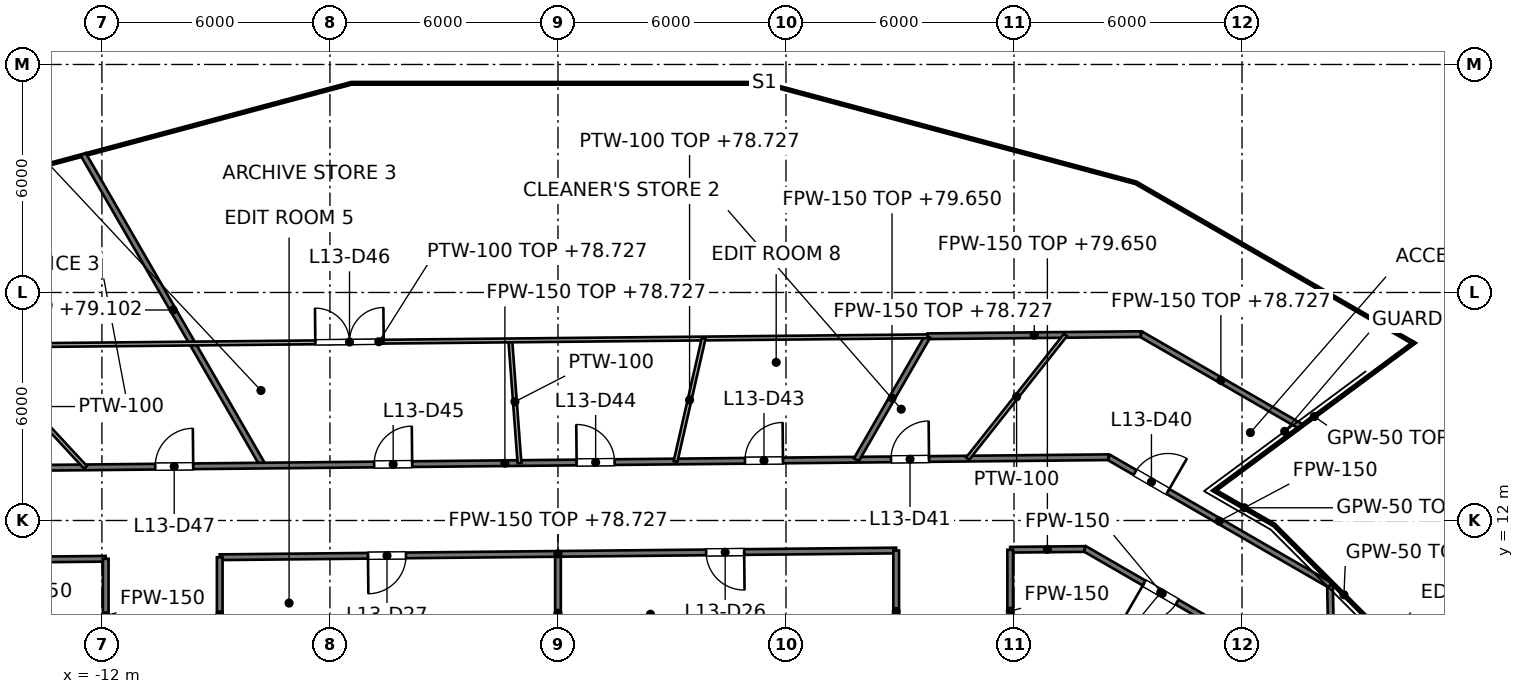
"""IFC4 building model, lengths in metres.
Left out: names, types, materials, properties, quantities, classifications, styles, units other than length and angle.
Written with IfcOpenShell. Run it as: python <this file> out.ifc"""

import sys

from ifc_helpers import new_model, si_unit, direction, frame, frame_2d, origin, place, context, subcontext, project, spatial, rectangle, extrude, element, fill, save


model = new_model("IFC4")
c1 = context("Model", 3, precision=1e-05, world=origin(), true_north=direction((0.0, 1.0)))
c2 = subcontext(c1, "Body", "Model", "MODEL_VIEW")
j1 = project(units=[si_unit("LENGTHUNIT", "METRE"), si_unit("PLANEANGLEUNIT", "RADIAN")], contexts=[c1])
p1 = place(None, origin())
s1 = spatial("IfcSite", under=j1, at=p1, CompositionType="ELEMENT")
p2 = place(p1, origin())
s2 = spatial("IfcBuilding", under=s1, at=p2, CompositionType="ELEMENT")
p3 = place(p2, frame((0.0, 0.0, 75.6)))
s3 = spatial("IfcBuildingStorey", under=s2, at=p3, CompositionType="ELEMENT", Elevation=75.6)
p4 = place(p3, frame((20.314, 10.301, 0.0), z_axis=(0.0, 0.0, 1.0), x_axis=(0.020779303351, -0.999784086967, 0.0)))
e1 = element("IfcWall", 1, at=p4, inside=s3, PredefinedType="PARTITIONING", context=c2, shape_type="SweptSolid", body=[
    extrude(rectangle(XDim=17.765, YDim=0.15, at=frame_2d((8.882, 0.0))), origin(), (0.0, 0.0, 1.0), 3.118),
])
p5 = place(p4, frame((13.714, 0.0, 0.0)))
e2 = element("IfcOpeningElement", 2, at=p5, cuts=e1, PredefinedType="OPENING", context=c2, shape_type="SweptSolid", body=[
    extrude(rectangle(XDim=1.0, YDim=2.1, at=frame_2d((0.5, 1.05))), frame((0.0, 0.075, 0.0), z_axis=(0.0, -1.0, 0.0), x_axis=(1.0, 0.0, 0.0)), (0.0, 0.0, 1.0), 0.15),
])
p6 = place(p4, frame((5.797, 0.0, 0.0)))
e3 = element("IfcOpeningElement", 3, at=p6, cuts=e1, PredefinedType="OPENING", context=c2, shape_type="SweptSolid", body=[
    extrude(rectangle(XDim=1.0, YDim=2.1, at=frame_2d((0.5, 1.05))), frame((0.0, 0.075, 0.0), z_axis=(0.0, -1.0, 0.0), x_axis=(1.0, 0.0, 0.0)), (0.0, 0.0, 1.0), 0.15),
])
p7 = place(p3, frame((-12.491, 21.634, 0.0), z_axis=(0.0, 0.0, 1.0), x_axis=(0.500023386278, -0.86601190129, 0.0)))
e4 = element("IfcWall", 4, at=p7, inside=s3, PredefinedType="PARTITIONING", context=c2, shape_type="SweptSolid", body=[
    extrude(rectangle(XDim=9.457, YDim=0.15, at=frame_2d((4.729, 0.0))), origin(), (0.0, 0.0, 1.0), 3.502),
])
p8 = place(p3, frame((13.856, 11.259, 0.0), z_axis=(0.0, 0.0, 1.0), x_axis=(0.865971100816, -0.500094043707, 0.0)))
e5 = element("IfcWall", 5, at=p8, inside=s3, PredefinedType="PARTITIONING", context=c2, shape_type="SweptSolid", body=[
    extrude(rectangle(XDim=4.72, YDim=0.15, at=frame_2d((2.36, 0.0))), origin(), (0.0, 0.0, 1.0), 3.195),
])
p9 = place(p8, frame((1.812, 0.0, 0.0)))
e6 = element("IfcOpeningElement", 6, at=p9, cuts=e5, PredefinedType="OPENING", context=c2, shape_type="SweptSolid", body=[
    extrude(rectangle(XDim=1.0, YDim=2.1, at=frame_2d((0.5, 1.05))), frame((0.0, 0.075, 0.0), z_axis=(0.0, -1.0, 0.0), x_axis=(1.0, 0.0, 0.0)), (0.0, 0.0, 1.0), 0.15),
])
p10 = place(p3, frame((14.488, 13.665, 0.0), z_axis=(0.0, 0.0, 1.0), x_axis=(0.865978916812, -0.500080509155, 0.0)))
e7 = element("IfcWall", 7, at=p10, inside=s3, PredefinedType="PARTITIONING", context=c2, shape_type="SweptSolid", body=[
    extrude(rectangle(XDim=6.729, YDim=0.15, at=frame_2d((3.364, 0.0))), origin(), (0.0, 0.0, 1.0), 3.195),
])
p11 = place(p10, frame((0.803, 0.0, 0.0)))
e8 = element("IfcOpeningElement", 8, at=p11, cuts=e7, PredefinedType="OPENING", context=c2, shape_type="SweptSolid", body=[
    extrude(rectangle(XDim=1.0, YDim=2.1, at=frame_2d((0.5, 1.05))), frame((0.0, 0.075, 0.0), z_axis=(0.0, -1.0, 0.0), x_axis=(1.0, 0.0, 0.0)), (0.0, 0.0, 1.0), 0.15),
])
p12 = place(p3, frame((15.339, 16.904, 0.0), z_axis=(0.0, 0.0, 1.0), x_axis=(0.865946300372, -0.500136986107, 0.0)))
e9 = element("IfcWall", 9, at=p12, inside=s3, PredefinedType="PARTITIONING", context=c2, shape_type="SweptSolid", body=[
    extrude(rectangle(XDim=4.86, YDim=0.15, at=frame_2d((2.43, 0.0))), origin(), (0.0, 0.0, 1.0), 3.127),
])
p13 = place(p3, frame((-15.887, 10.953, 0.0), z_axis=(0.0, 0.0, 1.0), x_axis=(0.999950802569, 0.009919296431, 0.0)))
e10 = element("IfcWall", 10, at=p13, inside=s3, PredefinedType="PARTITIONING", context=c2, shape_type="SweptSolid", body=[
    extrude(rectangle(XDim=3.987, YDim=0.15, at=frame_2d((1.994, 0.0))), origin(), (0.0, 0.0, 1.0), 3.195),
])
p14 = place(p3, frame((-8.9, 11.033, 0.0), z_axis=(0.0, 0.0, 1.0), x_axis=(0.999950834077, 0.009916119672, 0.0)))
e11 = element("IfcWall", 11, at=p14, inside=s3, PredefinedType="PARTITIONING", context=c2, shape_type="SweptSolid", body=[
    extrude(rectangle(XDim=17.801, YDim=0.15, at=frame_2d((8.9, 0.0))), origin(), (0.0, 0.0, 1.0), 3.127),
])
p15 = place(p14, frame((12.8, 0.0, 0.0)))
e12 = element("IfcOpeningElement", 12, at=p15, cuts=e11, PredefinedType="OPENING", context=c2, shape_type="SweptSolid", body=[
    extrude(rectangle(XDim=1.0, YDim=2.1, at=frame_2d((0.5, 1.05))), frame((0.0, 0.075, 0.0), z_axis=(0.0, -1.0, 0.0), x_axis=(1.0, 0.0, 0.0)), (0.0, 0.0, 1.0), 0.15),
])
p16 = place(p14, frame((3.901, 0.0, 0.0)))
e13 = element("IfcOpeningElement", 13, at=p16, cuts=e11, PredefinedType="OPENING", context=c2, shape_type="SweptSolid", body=[
    extrude(rectangle(XDim=1.0, YDim=2.1, at=frame_2d((0.5, 1.05))), frame((0.0, 0.075, 0.0), z_axis=(0.0, -1.0, 0.0), x_axis=(1.0, 0.0, 0.0)), (0.0, 0.0, 1.0), 0.15),
])
p17 = place(p3, frame((11.9, 11.23, 0.0), z_axis=(0.0, 0.0, 1.0), x_axis=(0.99995016583, 0.00998327883, 0.0)))
e14 = element("IfcWall", 14, at=p17, inside=s3, PredefinedType="PARTITIONING", context=c2, shape_type="SweptSolid", body=[
    extrude(rectangle(XDim=1.956, YDim=0.15, at=frame_2d((0.978, 0.0))), origin(), (0.0, 0.0, 1.0), 4.05),
])
p18 = place(p3, frame((-17.281, 13.35, 0.0), z_axis=(0.0, 0.0, 1.0), x_axis=(0.999950941336, 0.009905297661, 0.0)))
e15 = element("IfcWall", 15, at=p18, inside=s3, PredefinedType="PARTITIONING", context=c2, shape_type="SweptSolid", body=[
    extrude(rectangle(XDim=31.771, YDim=0.15, at=frame_2d((15.885, 0.0))), origin(), (0.0, 0.0, 1.0), 3.127),
])
p19 = place(p18, frame((26.046, 0.0, 0.0)))
e16 = element("IfcOpeningElement", 16, at=p19, cuts=e15, PredefinedType="OPENING", context=c2, shape_type="SweptSolid", body=[
    extrude(rectangle(XDim=1.0, YDim=2.1, at=frame_2d((0.5, 1.05))), frame((0.0, 0.075, 0.0), z_axis=(0.0, -1.0, 0.0), x_axis=(1.0, 0.0, 0.0)), (0.0, 0.0, 1.0), 0.15),
])
p20 = place(p18, frame((22.203, 0.0, 0.0)))
e17 = element("IfcOpeningElement", 17, at=p20, cuts=e15, PredefinedType="OPENING", context=c2, shape_type="SweptSolid", body=[
    extrude(rectangle(XDim=1.0, YDim=2.1, at=frame_2d((0.5, 1.05))), frame((0.0, 0.075, 0.0), z_axis=(0.0, -1.0, 0.0), x_axis=(1.0, 0.0, 0.0)), (0.0, 0.0, 1.0), 0.15),
])
p21 = place(p18, frame((17.773, 0.0, 0.0)))
e18 = element("IfcOpeningElement", 18, at=p21, cuts=e15, PredefinedType="OPENING", context=c2, shape_type="SweptSolid", body=[
    extrude(rectangle(XDim=1.0, YDim=2.1, at=frame_2d((0.5, 1.05))), frame((0.0, 0.075, 0.0), z_axis=(0.0, -1.0, 0.0), x_axis=(1.0, 0.0, 0.0)), (0.0, 0.0, 1.0), 0.15),
])
p22 = place(p18, frame((12.445, 0.0, 0.0)))
e19 = element("IfcOpeningElement", 19, at=p22, cuts=e15, PredefinedType="OPENING", context=c2, shape_type="SweptSolid", body=[
    extrude(rectangle(XDim=1.0, YDim=2.1, at=frame_2d((0.5, 1.05))), frame((0.0, 0.075, 0.0), z_axis=(0.0, -1.0, 0.0), x_axis=(1.0, 0.0, 0.0)), (0.0, 0.0, 1.0), 0.15),
])
p23 = place(p18, frame((6.684, 0.0, 0.0)))
e20 = element("IfcOpeningElement", 20, at=p23, cuts=e15, PredefinedType="OPENING", context=c2, shape_type="SweptSolid", body=[
    extrude(rectangle(XDim=1.0, YDim=2.1, at=frame_2d((0.5, 1.05))), frame((0.0, 0.075, 0.0), z_axis=(0.0, -1.0, 0.0), x_axis=(1.0, 0.0, 0.0)), (0.0, 0.0, 1.0), 0.15),
])
p24 = place(p18, frame((1.925, 0.0, 0.0)))
e21 = element("IfcOpeningElement", 21, at=p24, cuts=e15, PredefinedType="OPENING", context=c2, shape_type="SweptSolid", body=[
    extrude(rectangle(XDim=1.0, YDim=2.1, at=frame_2d((0.5, 1.05))), frame((0.0, 0.075, 0.0), z_axis=(0.0, -1.0, 0.0), x_axis=(1.0, 0.0, 0.0)), (0.0, 0.0, 1.0), 0.15),
])
p25 = place(p3, frame((9.728, 16.848, 0.0), z_axis=(0.0, 0.0, 1.0), x_axis=(0.999950796702, 0.009919887815, 0.0)))
e22 = element("IfcWall", 22, at=p25, inside=s3, PredefinedType="PARTITIONING", context=c2, shape_type="SweptSolid", body=[
    extrude(rectangle(XDim=5.611, YDim=0.15, at=frame_2d((2.806, 0.0))), origin(), (0.0, 0.0, 1.0), 3.127),
])
p26 = place(p3, frame((7.852, 13.599, 0.0), z_axis=(0.0, 0.0, 1.0), x_axis=(0.500233145618, 0.865890755249, 0.0)))
e23 = element("IfcWall", 23, at=p26, inside=s3, PredefinedType="PARTITIONING", context=c2, shape_type="SweptSolid", body=[
    extrude(rectangle(XDim=3.752, YDim=0.15, at=frame_2d((1.876, 0.0))), origin(), (0.0, 0.0, 1.0), 4.05),
])
p27 = place(p3, frame((11.9, 8.0, 0.0), z_axis=(0.0, 0.0, 1.0), x_axis=(0.0, 1.0, 0.0)))
e24 = element("IfcWall", 24, at=p27, inside=s3, PredefinedType="PARTITIONING", context=c2, shape_type="SweptSolid", body=[
    extrude(rectangle(XDim=3.229, YDim=0.15, at=frame_2d((1.615, 0.0))), origin(), (0.0, 0.0, 1.0), 3.195),
])
p28 = place(p3, frame((8.9, 8.0, 0.0), z_axis=(0.0, 0.0, 1.0), x_axis=(0.0, 1.0, 0.0)))
e25 = element("IfcWall", 25, at=p28, inside=s3, PredefinedType="PARTITIONING", context=c2, shape_type="SweptSolid", body=[
    extrude(rectangle(XDim=3.21, YDim=0.15, at=frame_2d((1.605, 0.0))), origin(), (0.0, 0.0, 1.0), 3.127),
])
p29 = place(p3, frame((0.0, 8.0, 0.0), z_axis=(0.0, 0.0, 1.0), x_axis=(0.0, 1.0, 0.0)))
e26 = element("IfcWall", 26, at=p29, inside=s3, PredefinedType="PARTITIONING", context=c2, shape_type="SweptSolid", body=[
    extrude(rectangle(XDim=3.122, YDim=0.15, at=frame_2d((1.561, 0.0))), origin(), (0.0, 0.0, 1.0), 3.127),
])
p30 = place(p3, frame((-8.9, 8.0, 0.0), z_axis=(0.0, 0.0, 1.0), x_axis=(0.0, 1.0, 0.0)))
e27 = element("IfcWall", 27, at=p30, inside=s3, PredefinedType="PARTITIONING", context=c2, shape_type="SweptSolid", body=[
    extrude(rectangle(XDim=3.033, YDim=0.15, at=frame_2d((1.517, 0.0))), origin(), (0.0, 0.0, 1.0), 3.127),
])
p31 = place(p3, frame((-11.9, 8.0, 0.0), z_axis=(0.0, 0.0, 1.0), x_axis=(0.0, 1.0, 0.0)))
e28 = element("IfcWall", 28, at=p31, inside=s3, PredefinedType="PARTITIONING", context=c2, shape_type="SweptSolid", body=[
    extrude(rectangle(XDim=2.992, YDim=0.15, at=frame_2d((1.496, 0.0))), origin(), (0.0, 0.0, 1.0), 3.195),
])
p32 = place(p3, frame((18.846, 11.88, 0.0), z_axis=(0.0, 0.0, 1.0), x_axis=(0.707130293807, -0.707083267785, 0.0)))
e29 = element("IfcWall", 29, at=p32, inside=s3, PredefinedType="PARTITIONING", context=c2, shape_type="SweptSolid", body=[
    extrude(rectangle(XDim=5.192, YDim=0.05, at=frame_2d((2.596, 0.0))), origin(), (0.0, 0.0, 1.0), 3.195),
])
p33 = place(p3, frame((17.273, 12.789, 0.0), z_axis=(0.0, 0.0, 1.0), x_axis=(0.865784864345, -0.500416395285, 0.0)))
e30 = element("IfcWall", 30, at=p33, inside=s3, PredefinedType="PARTITIONING", context=c2, shape_type="SweptSolid", body=[
    extrude(rectangle(XDim=1.817, YDim=0.05, at=frame_2d((0.908, 0.0))), origin(), (0.0, 0.0, 1.0), 3.195),
])
p34 = place(p3, frame((17.273, 12.789, 0.0), z_axis=(0.0, 0.0, 1.0), x_axis=(0.803675532146, 0.595067760032, 0.0)))
e31 = element("IfcWall", 31, at=p34, inside=s3, PredefinedType="PARTITIONING", context=c2, shape_type="SweptSolid", body=[
    extrude(rectangle(XDim=6.541, YDim=0.05, at=frame_2d((3.271, 0.0))), origin(), (0.0, 0.0, 1.0), 3.195),
])
p35 = place(p3, frame((-1.254, 16.74, 0.0), z_axis=(0.0, 0.0, 1.0), x_axis=(0.074718721269, -0.997204649353, 0.0)))
e32 = element("IfcWall", 32, at=p35, inside=s3, PredefinedType="PARTITIONING", context=c2, shape_type="SweptSolid", body=[
    extrude(rectangle(XDim=3.238, YDim=0.1, at=frame_2d((1.619, 0.0))), origin(), (0.0, 0.0, 1.0), 4.05),
])
p36 = place(p3, frame((-15.402, 16.599, 0.0), z_axis=(0.0, 0.0, 1.0), x_axis=(0.68016798927, -0.733056277766, 0.0)))
e33 = element("IfcWall", 33, at=p36, inside=s3, PredefinedType="PARTITIONING", context=c2, shape_type="SweptSolid", body=[
    extrude(rectangle(XDim=4.367, YDim=0.1, at=frame_2d((2.184, 0.0))), origin(), (0.0, 0.0, 1.0), 4.05),
])
p37 = place(p3, frame((-19.157, 16.562, 0.0), z_axis=(0.0, 0.0, 1.0), x_axis=(0.99995144091, 0.009854735998, 0.0)))
e34 = element("IfcWall", 34, at=p37, inside=s3, PredefinedType="PARTITIONING", context=c2, shape_type="SweptSolid", body=[
    extrude(rectangle(XDim=28.886, YDim=0.1, at=frame_2d((14.443, 0.0))), origin(), (0.0, 0.0, 1.0), 3.127),
])
p38 = place(p37, frame((12.773, 0.0, 0.0)))
e35 = element("IfcOpeningElement", 35, at=p38, cuts=e34, PredefinedType="OPENING", context=c2, shape_type="SweptSolid", body=[
    extrude(rectangle(XDim=1.8, YDim=2.1, at=frame_2d((0.9, 1.05))), frame((0.0, 0.05, 0.0), z_axis=(0.0, -1.0, 0.0), x_axis=(1.0, 0.0, 0.0)), (0.0, 0.0, 1.0), 0.1),
])
p39 = place(p3, frame((10.78, 13.628, 0.0), z_axis=(0.0, 0.0, 1.0), x_axis=(0.620433303775, 0.784259214525, 0.0)))
e36 = element("IfcWall", 36, at=p39, inside=s3, PredefinedType="PARTITIONING", context=c2, shape_type="SweptSolid", body=[
    extrude(rectangle(XDim=4.152, YDim=0.1, at=frame_2d((2.076, 0.0))), origin(), (0.0, 0.0, 1.0), 4.05),
])
p40 = place(p3, frame((3.093, 13.552, 0.0), z_axis=(0.0, 0.0, 1.0), x_axis=(0.222786880978, 0.974867173344, 0.0)))
e37 = element("IfcWall", 37, at=p40, inside=s3, PredefinedType="PARTITIONING", context=c2, shape_type="SweptSolid", body=[
    extrude(rectangle(XDim=3.322, YDim=0.1, at=frame_2d((1.661, 0.0))), origin(), (0.0, 0.0, 1.0), 3.127),
])
p41 = place(p9, origin())
e38 = element("IfcDoor", 38, at=p41, inside=s3, OperationType="SINGLE_SWING_LEFT", PredefinedType="DOOR", context=c2, shape_type="SweptSolid", body=[
    extrude(rectangle(XDim=1.0, YDim=2.1, at=frame_2d((0.5, 1.05))), frame((0.0, 0.025, 0.0), z_axis=(0.0, -1.0, 0.0), x_axis=(1.0, 0.0, 0.0)), (0.0, 0.0, 1.0), 0.05),
])
fill(e6, e38)
p42 = place(p15, origin())
e39 = element("IfcDoor", 39, at=p42, inside=s3, OperationType="SINGLE_SWING_RIGHT", PredefinedType="DOOR", context=c2, shape_type="SweptSolid", body=[
    extrude(rectangle(XDim=1.0, YDim=2.1, at=frame_2d((0.5, 1.05))), frame((0.0, 0.025, 0.0), z_axis=(0.0, -1.0, 0.0), x_axis=(1.0, 0.0, 0.0)), (0.0, 0.0, 1.0), 0.05),
])
fill(e12, e39)
p43 = place(p16, origin())
e40 = element("IfcDoor", 40, at=p43, inside=s3, OperationType="SINGLE_SWING_LEFT", PredefinedType="DOOR", context=c2, shape_type="SweptSolid", body=[
    extrude(rectangle(XDim=1.0, YDim=2.1, at=frame_2d((0.5, 1.05))), frame((0.0, 0.025, 0.0), z_axis=(0.0, -1.0, 0.0), x_axis=(1.0, 0.0, 0.0)), (0.0, 0.0, 1.0), 0.05),
])
fill(e13, e40)
p44 = place(p11, origin())
e41 = element("IfcDoor", 41, at=p44, inside=s3, OperationType="SINGLE_SWING_RIGHT", PredefinedType="DOOR", context=c2, shape_type="SweptSolid", body=[
    extrude(rectangle(XDim=1.0, YDim=2.1, at=frame_2d((0.5, 1.05))), frame((0.0, 0.025, 0.0), z_axis=(0.0, -1.0, 0.0), x_axis=(1.0, 0.0, 0.0)), (0.0, 0.0, 1.0), 0.05),
])
fill(e8, e41)
p45 = place(p19, origin())
e42 = element("IfcDoor", 42, at=p45, inside=s3, OperationType="SINGLE_SWING_RIGHT", PredefinedType="DOOR", context=c2, shape_type="SweptSolid", body=[
    extrude(rectangle(XDim=1.0, YDim=2.1, at=frame_2d((0.5, 1.05))), frame((0.0, 0.025, 0.0), z_axis=(0.0, -1.0, 0.0), x_axis=(1.0, 0.0, 0.0)), (0.0, 0.0, 1.0), 0.05),
])
fill(e16, e42)
p46 = place(p20, origin())
e43 = element("IfcDoor", 43, at=p46, inside=s3, OperationType="SINGLE_SWING_RIGHT", PredefinedType="DOOR", context=c2, shape_type="SweptSolid", body=[
    extrude(rectangle(XDim=1.0, YDim=2.1, at=frame_2d((0.5, 1.05))), frame((0.0, 0.025, 0.0), z_axis=(0.0, -1.0, 0.0), x_axis=(1.0, 0.0, 0.0)), (0.0, 0.0, 1.0), 0.05),
])
fill(e17, e43)
p47 = place(p21, origin())
e44 = element("IfcDoor", 44, at=p47, inside=s3, OperationType="SINGLE_SWING_LEFT", PredefinedType="DOOR", context=c2, shape_type="SweptSolid", body=[
    extrude(rectangle(XDim=1.0, YDim=2.1, at=frame_2d((0.5, 1.05))), frame((0.0, 0.025, 0.0), z_axis=(0.0, -1.0, 0.0), x_axis=(1.0, 0.0, 0.0)), (0.0, 0.0, 1.0), 0.05),
])
fill(e18, e44)
p48 = place(p22, origin())
e45 = element("IfcDoor", 45, at=p48, inside=s3, OperationType="SINGLE_SWING_RIGHT", PredefinedType="DOOR", context=c2, shape_type="SweptSolid", body=[
    extrude(rectangle(XDim=1.0, YDim=2.1, at=frame_2d((0.5, 1.05))), frame((0.0, 0.025, 0.0), z_axis=(0.0, -1.0, 0.0), x_axis=(1.0, 0.0, 0.0)), (0.0, 0.0, 1.0), 0.05),
])
fill(e19, e45)
p49 = place(p38, origin())
e46 = element("IfcDoor", 46, at=p49, inside=s3, OperationType="DOUBLE_DOOR_SINGLE_SWING", PredefinedType="DOOR", context=c2, shape_type="SweptSolid", body=[
    extrude(rectangle(XDim=1.8, YDim=2.1, at=frame_2d((0.9, 1.05))), frame((0.0, 0.025, 0.0), z_axis=(0.0, -1.0, 0.0), x_axis=(1.0, 0.0, 0.0)), (0.0, 0.0, 1.0), 0.05),
])
fill(e35, e46)
p50 = place(p23, origin())
e47 = element("IfcDoor", 47, at=p50, inside=s3, OperationType="SINGLE_SWING_RIGHT", PredefinedType="DOOR", context=c2, shape_type="SweptSolid", body=[
    extrude(rectangle(XDim=1.0, YDim=2.1, at=frame_2d((0.5, 1.05))), frame((0.0, 0.025, 0.0), z_axis=(0.0, -1.0, 0.0), x_axis=(1.0, 0.0, 0.0)), (0.0, 0.0, 1.0), 0.05),
])
fill(e20, e47)
save(model, sys.argv[1])
